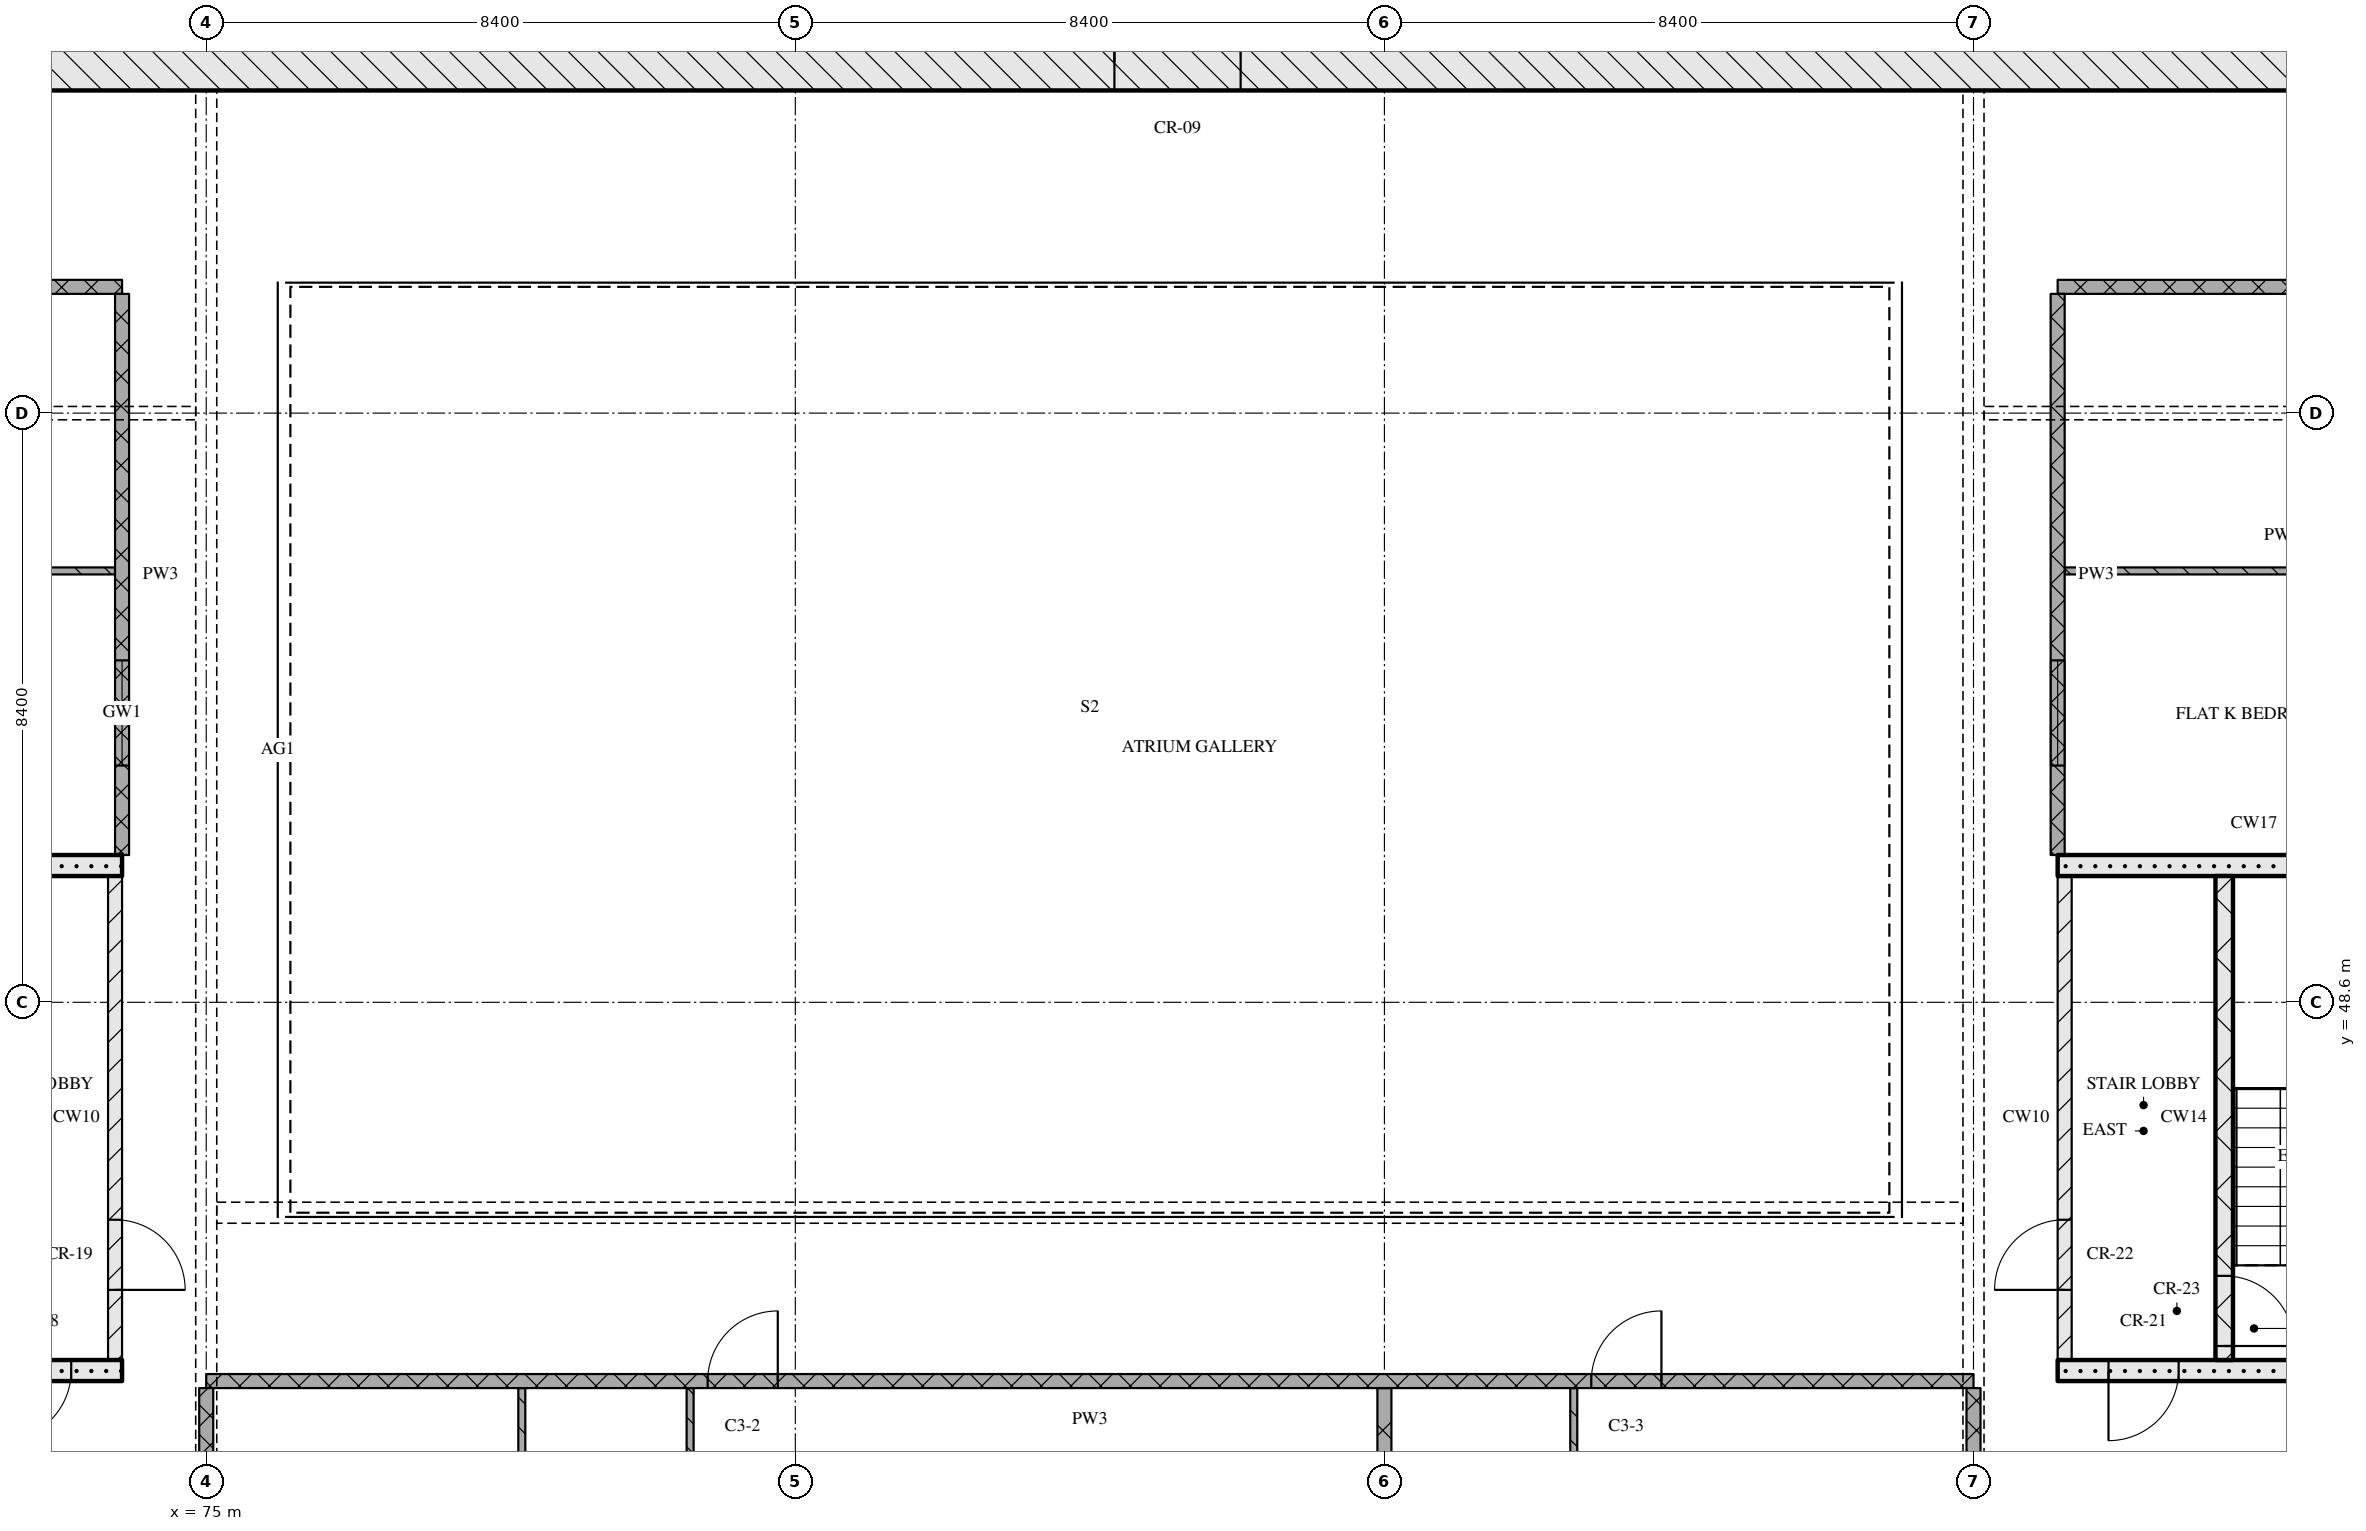
"""IFC4 building model, lengths in metres.
Left out: names, types, materials, properties, quantities, classifications, styles, units other than length and angle.
Written with IfcOpenShell. Run it as: python <this file> out.ifc"""

import sys

from ifc_helpers import new_model, si_unit, direction, frame, frame_2d, origin, place, context, subcontext, project, spatial, rectangle, extrude, element, fill, save


model = new_model("IFC4")
c1 = context("Model", 3, precision=1e-05, world=origin(), true_north=direction((0.0, 1.0)))
c2 = subcontext(c1, "Body", "Model", "MODEL_VIEW")
j1 = project(units=[si_unit("LENGTHUNIT", "METRE"), si_unit("PLANEANGLEUNIT", "RADIAN")], contexts=[c1])
p1 = place(None, origin())
s1 = spatial("IfcSite", under=j1, at=p1, CompositionType="ELEMENT")
p2 = place(p1, origin())
s2 = spatial("IfcBuilding", under=s1, at=p2, CompositionType="ELEMENT")
p3 = place(p2, frame((0.0, 0.0, 169.05)))
s3 = spatial("IfcBuildingStorey", under=s2, at=p3, CompositionType="ELEMENT", Elevation=169.05)
p4 = place(p3, frame((67.0, 62.0, 0.0), z_axis=(0.0, 0.0, 1.0), x_axis=(1.0, 0.0, 0.0)))
e1 = element("IfcWall", 1, at=p4, inside=s3, PredefinedType="SOLIDWALL", context=c2, shape_type="SweptSolid", body=[
    extrude(rectangle(XDim=41.2, YDim=0.8, at=frame_2d((20.6, 0.0))), origin(), (0.0, 0.0, 1.0), 3.32),
])
p5 = place(p4, frame((20.95, 0.0, 0.0)))
e2 = element("IfcOpeningElement", 2, at=p5, cuts=e1, PredefinedType="OPENING", context=c2, shape_type="SweptSolid", body=[
    extrude(rectangle(XDim=1.8, YDim=2.1, at=frame_2d((0.9, 1.05))), frame((0.0, 0.41, 0.0), z_axis=(0.0, -1.0, 0.0), x_axis=(1.0, 0.0, 0.0)), (0.0, 0.0, 1.0), 0.82),
])
p6 = place(p3, frame((68.2, 43.35, 0.0), z_axis=(0.0, 0.0, 1.0), x_axis=(1.0, 0.0, 0.0)))
e3 = element("IfcWall", 3, at=p6, inside=s3, PredefinedType="SOLIDWALL", context=c2, shape_type="SweptSolid", body=[
    extrude(rectangle(XDim=5.6, YDim=0.3, at=frame_2d((2.8, 0.0))), origin(), (0.0, 0.0, 1.0), 3.32),
])
p7 = place(p6, frame((3.875, 0.0, 0.0)))
e4 = element("IfcOpeningElement", 4, at=p7, cuts=e3, PredefinedType="OPENING", context=c2, shape_type="SweptSolid", body=[
    extrude(rectangle(XDim=1.0, YDim=2.1, at=frame_2d((0.5, 1.05))), frame((0.0, 0.16, 0.0), z_axis=(0.0, -1.0, 0.0), x_axis=(1.0, 0.0, 0.0)), (0.0, 0.0, 1.0), 0.32),
])
p8 = place(p3, frame((73.7, 43.5, 0.0), z_axis=(0.0, 0.0, 1.0), x_axis=(0.0, 1.0, 0.0)))
e5 = element("IfcWall", 5, at=p8, inside=s3, PredefinedType="PARTITIONING", context=c2, shape_type="SweptSolid", body=[
    extrude(rectangle(XDim=6.9, YDim=0.2, at=frame_2d((3.45, 0.0))), origin(), (0.0, 0.0, 1.0), 3.32),
])
p9 = place(p8, frame((1.0, 0.0, 0.0)))
e6 = element("IfcOpeningElement", 6, at=p9, cuts=e5, PredefinedType="OPENING", context=c2, shape_type="SweptSolid", body=[
    extrude(rectangle(XDim=1.0, YDim=2.1, at=frame_2d((0.5, 1.05))), frame((0.0, 0.11, 0.0), z_axis=(0.0, -1.0, 0.0), x_axis=(1.0, 0.0, 0.0)), (0.0, 0.0, 1.0), 0.22),
])
p10 = place(p3, frame((68.2, 50.55, 0.0), z_axis=(0.0, 0.0, 1.0), x_axis=(1.0, 0.0, 0.0)))
e7 = element("IfcWall", 7, at=p10, inside=s3, PredefinedType="SOLIDWALL", context=c2, shape_type="SweptSolid", body=[
    extrude(rectangle(XDim=5.6, YDim=0.3, at=frame_2d((2.8, 0.0))), origin(), (0.0, 0.0, 1.0), 3.32),
])
p11 = place(p3, frame((101.4, 43.35, 0.0), z_axis=(0.0, 0.0, 1.0), x_axis=(1.0, 0.0, 0.0)))
e8 = element("IfcWall", 8, at=p11, inside=s3, PredefinedType="SOLIDWALL", context=c2, shape_type="SweptSolid", body=[
    extrude(rectangle(XDim=5.6, YDim=0.3, at=frame_2d((2.8, 0.0))), origin(), (0.0, 0.0, 1.0), 3.32),
])
p12 = place(p11, frame((0.725, 0.0, 0.0)))
e9 = element("IfcOpeningElement", 9, at=p12, cuts=e8, PredefinedType="OPENING", context=c2, shape_type="SweptSolid", body=[
    extrude(rectangle(XDim=1.0, YDim=2.1, at=frame_2d((0.5, 1.05))), frame((0.0, 0.16, 0.0), z_axis=(0.0, -1.0, 0.0), x_axis=(1.0, 0.0, 0.0)), (0.0, 0.0, 1.0), 0.32),
])
p13 = place(p3, frame((101.5, 43.5, 0.0), z_axis=(0.0, 0.0, 1.0), x_axis=(0.0, 1.0, 0.0)))
e10 = element("IfcWall", 10, at=p13, inside=s3, PredefinedType="PARTITIONING", context=c2, shape_type="SweptSolid", body=[
    extrude(rectangle(XDim=6.9, YDim=0.2, at=frame_2d((3.45, 0.0))), origin(), (0.0, 0.0, 1.0), 3.32),
])
p14 = place(p13, frame((1.0, 0.0, 0.0)))
e11 = element("IfcOpeningElement", 11, at=p14, cuts=e10, PredefinedType="OPENING", context=c2, shape_type="SweptSolid", body=[
    extrude(rectangle(XDim=1.0, YDim=2.1, at=frame_2d((0.5, 1.05))), frame((0.0, 0.11, 0.0), z_axis=(0.0, -1.0, 0.0), x_axis=(1.0, 0.0, 0.0)), (0.0, 0.0, 1.0), 0.22),
])
p15 = place(p3, frame((103.775, 43.5, 0.0), z_axis=(0.0, 0.0, 1.0), x_axis=(0.0, 1.0, 0.0)))
e12 = element("IfcWall", 12, at=p15, inside=s3, PredefinedType="SOLIDWALL", context=c2, shape_type="SweptSolid", body=[
    extrude(rectangle(XDim=6.9, YDim=0.25, at=frame_2d((3.45, 0.0))), origin(), (0.0, 0.0, 1.0), 3.32),
])
p16 = place(p15, frame((0.2, 0.0, 0.0)))
e13 = element("IfcOpeningElement", 13, at=p16, cuts=e12, PredefinedType="OPENING", context=c2, shape_type="SweptSolid", body=[
    extrude(rectangle(XDim=1.0, YDim=2.1, at=frame_2d((0.5, 1.05))), frame((0.0, 0.135, 0.0), z_axis=(0.0, -1.0, 0.0), x_axis=(1.0, 0.0, 0.0)), (0.0, 0.0, 1.0), 0.27),
])
p17 = place(p3, frame((101.4, 50.55, 0.0), z_axis=(0.0, 0.0, 1.0), x_axis=(1.0, 0.0, 0.0)))
e14 = element("IfcWall", 14, at=p17, inside=s3, PredefinedType="SOLIDWALL", context=c2, shape_type="SweptSolid", body=[
    extrude(rectangle(XDim=5.6, YDim=0.3, at=frame_2d((2.8, 0.0))), origin(), (0.0, 0.0, 1.0), 3.32),
])
p18 = place(p3, frame((100.2, 43.2, 0.0), z_axis=(0.0, 0.0, 1.0), x_axis=(-1.0, 0.0, 0.0)))
e15 = element("IfcWall", 15, at=p18, inside=s3, PredefinedType="PARTITIONING", context=c2, shape_type="SweptSolid", body=[
    extrude(rectangle(XDim=25.2, YDim=0.2, at=frame_2d((12.6, 0.0))), origin(), (0.0, 0.0, 1.0), 3.32),
])
p19 = place(p18, frame((4.45, 0.0, 0.0)))
e16 = element("IfcOpeningElement", 16, at=p19, cuts=e15, PredefinedType="OPENING", context=c2, shape_type="SweptSolid", body=[
    extrude(rectangle(XDim=1.0, YDim=2.1, at=frame_2d((0.5, 1.05))), frame((0.0, 0.11, 0.0), z_axis=(0.0, -1.0, 0.0), x_axis=(1.0, 0.0, 0.0)), (0.0, 0.0, 1.0), 0.22),
])
p20 = place(p18, frame((17.05, 0.0, 0.0)))
e17 = element("IfcOpeningElement", 17, at=p20, cuts=e15, PredefinedType="OPENING", context=c2, shape_type="SweptSolid", body=[
    extrude(rectangle(XDim=1.0, YDim=2.1, at=frame_2d((0.5, 1.05))), frame((0.0, 0.11, 0.0), z_axis=(0.0, -1.0, 0.0), x_axis=(1.0, 0.0, 0.0)), (0.0, 0.0, 1.0), 0.22),
])
p21 = place(p3, frame((73.7, 54.75, 0.0), z_axis=(0.0, 0.0, 1.0), x_axis=(-1.0, 0.0, 0.0)))
e18 = element("IfcWall", 18, at=p21, inside=s3, PredefinedType="PARTITIONING", context=c2, shape_type="SweptSolid", body=[
    extrude(rectangle(XDim=5.3, YDim=0.1, at=frame_2d((2.65, 0.0))), origin(), (0.0, 0.0, 1.0), 3.32),
])
p22 = place(p21, frame((2.15, 0.0, 0.0)))
e19 = element("IfcOpeningElement", 19, at=p22, cuts=e18, PredefinedType="OPENING", context=c2, shape_type="SweptSolid", body=[
    extrude(rectangle(XDim=0.9, YDim=2.1, at=frame_2d((0.45, 1.05))), frame((0.0, 0.06, 0.0), z_axis=(0.0, -1.0, 0.0), x_axis=(1.0, 0.0, 0.0)), (0.0, 0.0, 1.0), 0.12),
])
p23 = place(p3, frame((101.5, 54.75, 0.0), z_axis=(0.0, 0.0, 1.0), x_axis=(1.0, 0.0, 0.0)))
e20 = element("IfcWall", 20, at=p23, inside=s3, PredefinedType="PARTITIONING", context=c2, shape_type="SweptSolid", body=[
    extrude(rectangle(XDim=6.2, YDim=0.1, at=frame_2d((3.1, 0.0))), origin(), (0.0, 0.0, 1.0), 3.32),
])
p24 = place(p3, frame((63.0, 58.8, 0.0), z_axis=(0.0, 0.0, 1.0), x_axis=(1.0, 0.0, 0.0)))
e21 = element("IfcWall", 21, at=p24, inside=s3, PredefinedType="PARTITIONING", context=c2, shape_type="SweptSolid", body=[
    extrude(rectangle(XDim=10.8, YDim=0.2, at=frame_2d((5.4, 0.0))), origin(), (0.0, 0.0, 1.0), 3.32),
])
p25 = place(p3, frame((112.2, 58.8, 0.0), z_axis=(0.0, 0.0, 1.0), x_axis=(-1.0, 0.0, 0.0)))
e22 = element("IfcWall", 22, at=p25, inside=s3, PredefinedType="PARTITIONING", context=c2, shape_type="SweptSolid", body=[
    extrude(rectangle(XDim=10.8, YDim=0.2, at=frame_2d((5.4, 0.0))), origin(), (0.0, 0.0, 1.0), 3.32),
])
p26 = place(p25, frame((2.85, 0.0, 0.0)))
e23 = element("IfcOpeningElement", 23, at=p26, cuts=e22, PredefinedType="OPENING", context=c2, shape_type="SweptSolid", body=[
    extrude(rectangle(XDim=1.0, YDim=2.1, at=frame_2d((0.5, 1.05))), frame((0.0, 0.11, 0.0), z_axis=(0.0, -1.0, 0.0), x_axis=(1.0, 0.0, 0.0)), (0.0, 0.0, 1.0), 0.22),
])
p27 = place(p3, frame((73.8, 58.7, 0.0), z_axis=(0.0, 0.0, 1.0), x_axis=(0.0, -1.0, 0.0)))
e24 = element("IfcWall", 24, at=p27, inside=s3, PredefinedType="PARTITIONING", context=c2, shape_type="SweptSolid", body=[
    extrude(rectangle(XDim=8.0, YDim=0.2, at=frame_2d((4.0, 0.0))), origin(), (0.0, 0.0, 1.0), 3.32),
])
p28 = place(p27, frame((5.225, 0.0, 0.9)))
e25 = element("IfcOpeningElement", 25, at=p28, cuts=e24, PredefinedType="OPENING", context=c2, shape_type="SweptSolid", body=[
    extrude(rectangle(XDim=1.5, YDim=1.5, at=frame_2d((0.75, 0.75))), frame((0.0, 0.11, 0.0), z_axis=(0.0, -1.0, 0.0), x_axis=(1.0, 0.0, 0.0)), (0.0, 0.0, 1.0), 0.22),
])
p29 = place(p3, frame((75.0, 43.1, 0.0), z_axis=(0.0, 0.0, 1.0), x_axis=(0.0, -1.0, 0.0)))
e26 = element("IfcWall", 26, at=p29, inside=s3, PredefinedType="PARTITIONING", context=c2, shape_type="SweptSolid", body=[
    extrude(rectangle(XDim=2.2, YDim=0.2, at=frame_2d((1.1, 0.0))), origin(), (0.0, 0.0, 1.0), 2.43),
])
for number, where, z_axis, x_axis in (
    (27, (79.5, 43.1, 0.0), (0.0, 0.0, 1.0), (0.0, -1.0, 0.0)),
    (28, (81.9, 43.1, 0.0), (0.0, 0.0, 1.0), (0.0, -1.0, 0.0)),
):
    element("IfcWall", number, at=place(p3, frame(where, z_axis=z_axis, x_axis=x_axis)), inside=s3, PredefinedType="PARTITIONING", context=c2, shape_type="SweptSolid", body=[
        extrude(rectangle(XDim=4.35, YDim=0.1, at=frame_2d((2.175, 0.0))), origin(), (0.0, 0.0, 1.0), 3.32),
    ])
p30 = place(p3, frame((91.8, 43.1, 0.0), z_axis=(0.0, 0.0, 1.0), x_axis=(0.0, -1.0, 0.0)))
e29 = element("IfcWall", 29, at=p30, inside=s3, PredefinedType="PARTITIONING", context=c2, shape_type="SweptSolid", body=[
    extrude(rectangle(XDim=2.53, YDim=0.2, at=frame_2d((1.265, 0.0))), origin(), (0.0, 0.0, 1.0), 3.32),
])
p31 = place(p3, frame((94.5, 43.1, 0.0), z_axis=(0.0, 0.0, 1.0), x_axis=(0.0, -1.0, 0.0)))
e30 = element("IfcWall", 30, at=p31, inside=s3, PredefinedType="PARTITIONING", context=c2, shape_type="SweptSolid", body=[
    extrude(rectangle(XDim=3.75, YDim=0.1, at=frame_2d((1.875, 0.0))), origin(), (0.0, 0.0, 1.0), 3.32),
])
p32 = place(p3, frame((100.2, 43.1, 0.0), z_axis=(0.0, 0.0, 1.0), x_axis=(0.0, -1.0, 0.0)))
e31 = element("IfcWall", 31, at=p32, inside=s3, PredefinedType="PARTITIONING", context=c2, shape_type="SweptSolid", body=[
    extrude(rectangle(XDim=2.2, YDim=0.2, at=frame_2d((1.1, 0.0))), origin(), (0.0, 0.0, 1.0), 2.43),
])
p33 = place(p3, frame((101.4, 58.7, 0.0), z_axis=(0.0, 0.0, 1.0), x_axis=(0.0, -1.0, 0.0)))
e32 = element("IfcWall", 32, at=p33, inside=s3, PredefinedType="PARTITIONING", context=c2, shape_type="SweptSolid", body=[
    extrude(rectangle(XDim=8.0, YDim=0.2, at=frame_2d((4.0, 0.0))), origin(), (0.0, 0.0, 1.0), 3.32),
])
p34 = place(p33, frame((5.225, 0.0, 0.9)))
e33 = element("IfcOpeningElement", 33, at=p34, cuts=e32, PredefinedType="OPENING", context=c2, shape_type="SweptSolid", body=[
    extrude(rectangle(XDim=1.5, YDim=1.5, at=frame_2d((0.75, 0.75))), frame((0.0, 0.11, 0.0), z_axis=(0.0, -1.0, 0.0), x_axis=(1.0, 0.0, 0.0)), (0.0, 0.0, 1.0), 0.22),
])
p35 = place(p5, origin())
e34 = element("IfcDoor", 34, at=p35, inside=s3, OperationType="DOUBLE_DOOR_SINGLE_SWING", PredefinedType="DOOR", context=c2, shape_type="SweptSolid", body=[
    extrude(rectangle(XDim=1.8, YDim=2.1, at=frame_2d((0.9, 1.05))), frame((0.0, 0.025, 0.0), z_axis=(0.0, -1.0, 0.0), x_axis=(1.0, 0.0, 0.0)), (0.0, 0.0, 1.0), 0.05),
])
fill(e2, e34)
p36 = place(p7, origin())
e35 = element("IfcDoor", 35, at=p36, inside=s3, OperationType="SINGLE_SWING_RIGHT", PredefinedType="DOOR", context=c2, shape_type="SweptSolid", body=[
    extrude(rectangle(XDim=1.0, YDim=2.1, at=frame_2d((0.5, 1.05))), frame((0.0, 0.025, 0.0), z_axis=(0.0, -1.0, 0.0), x_axis=(1.0, 0.0, 0.0)), (0.0, 0.0, 1.0), 0.05),
])
fill(e4, e35)
p37 = place(p9, origin())
e36 = element("IfcDoor", 36, at=p37, inside=s3, OperationType="SINGLE_SWING_RIGHT", PredefinedType="DOOR", context=c2, shape_type="SweptSolid", body=[
    extrude(rectangle(XDim=1.0, YDim=2.1, at=frame_2d((0.5, 1.05))), frame((0.0, 0.025, 0.0), z_axis=(0.0, -1.0, 0.0), x_axis=(1.0, 0.0, 0.0)), (0.0, 0.0, 1.0), 0.05),
])
fill(e6, e36)
p38 = place(p12, origin())
e37 = element("IfcDoor", 37, at=p38, inside=s3, OperationType="SINGLE_SWING_RIGHT", PredefinedType="DOOR", context=c2, shape_type="SweptSolid", body=[
    extrude(rectangle(XDim=1.0, YDim=2.1, at=frame_2d((0.5, 1.05))), frame((0.0, 0.025, 0.0), z_axis=(0.0, -1.0, 0.0), x_axis=(1.0, 0.0, 0.0)), (0.0, 0.0, 1.0), 0.05),
])
fill(e9, e37)
p39 = place(p16, origin())
e38 = element("IfcDoor", 38, at=p39, inside=s3, OperationType="SINGLE_SWING_RIGHT", PredefinedType="DOOR", context=c2, shape_type="SweptSolid", body=[
    extrude(rectangle(XDim=1.0, YDim=2.1, at=frame_2d((0.5, 1.05))), frame((0.0, 0.025, 0.0), z_axis=(0.0, -1.0, 0.0), x_axis=(1.0, 0.0, 0.0)), (0.0, 0.0, 1.0), 0.05),
])
fill(e13, e38)
p40 = place(p14, origin())
e39 = element("IfcDoor", 39, at=p40, inside=s3, OperationType="SINGLE_SWING_LEFT", PredefinedType="DOOR", context=c2, shape_type="SweptSolid", body=[
    extrude(rectangle(XDim=1.0, YDim=2.1, at=frame_2d((0.5, 1.05))), frame((0.0, 0.025, 0.0), z_axis=(0.0, -1.0, 0.0), x_axis=(1.0, 0.0, 0.0)), (0.0, 0.0, 1.0), 0.05),
])
fill(e11, e39)
p41 = place(p19, origin())
e40 = element("IfcDoor", 40, at=p41, inside=s3, OperationType="SINGLE_SWING_RIGHT", PredefinedType="DOOR", context=c2, shape_type="SweptSolid", body=[
    extrude(rectangle(XDim=1.0, YDim=2.1, at=frame_2d((0.5, 1.05))), frame((0.0, 0.025, 0.0), z_axis=(0.0, -1.0, 0.0), x_axis=(1.0, 0.0, 0.0)), (0.0, 0.0, 1.0), 0.05),
])
fill(e16, e40)
p42 = place(p20, origin())
e41 = element("IfcDoor", 41, at=p42, inside=s3, OperationType="SINGLE_SWING_RIGHT", PredefinedType="DOOR", context=c2, shape_type="SweptSolid", body=[
    extrude(rectangle(XDim=1.0, YDim=2.1, at=frame_2d((0.5, 1.05))), frame((0.0, 0.025, 0.0), z_axis=(0.0, -1.0, 0.0), x_axis=(1.0, 0.0, 0.0)), (0.0, 0.0, 1.0), 0.05),
])
fill(e17, e41)
p43 = place(p28, origin())
e42 = element("IfcWindow", 42, at=p43, inside=s3, PartitioningType="SINGLE_PANEL", PredefinedType="WINDOW", context=c2, shape_type="SweptSolid", body=[
    extrude(rectangle(XDim=1.5, YDim=1.5, at=frame_2d((0.75, 0.75))), frame((0.0, 0.03, 0.0), z_axis=(0.0, -1.0, 0.0), x_axis=(1.0, 0.0, 0.0)), (0.0, 0.0, 1.0), 0.06),
])
fill(e25, e42)
p44 = place(p34, origin())
e43 = element("IfcWindow", 43, at=p44, inside=s3, PartitioningType="SINGLE_PANEL", PredefinedType="WINDOW", context=c2, shape_type="SweptSolid", body=[
    extrude(rectangle(XDim=1.5, YDim=1.5, at=frame_2d((0.75, 0.75))), frame((0.0, 0.03, 0.0), z_axis=(0.0, -1.0, 0.0), x_axis=(1.0, 0.0, 0.0)), (0.0, 0.0, 1.0), 0.06),
])
fill(e33, e43)
save(model, sys.argv[1])
